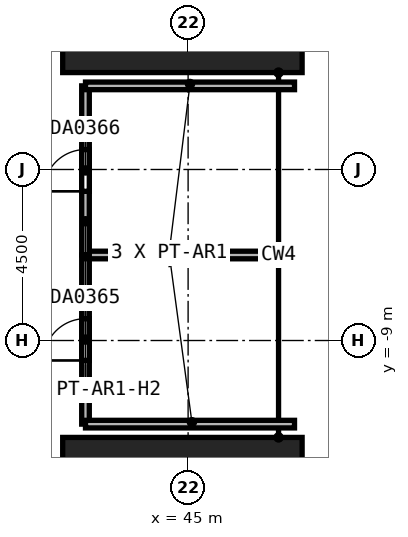
"""IFC4 building model, lengths in metres.
Left out: names, types, materials, properties, quantities, classifications, styles, units other than length and angle.
Written with IfcOpenShell. Run it as: python <this file> out.ifc"""

import sys

from ifc_helpers import new_model, si_unit, direction, frame, frame_2d, origin, origin_2d, place, context, subcontext, project, spatial, rectangle, extrude, element, fill, save


model = new_model("IFC4")
c1 = context("Model", 3, precision=1e-05, world=origin(), true_north=direction((0.0, 1.0)))
c2 = subcontext(c1, "Body", "Model", "MODEL_VIEW")
j1 = project(units=[si_unit("LENGTHUNIT", "METRE"), si_unit("PLANEANGLEUNIT", "RADIAN")], contexts=[c1])
p1 = place(None, origin())
s1 = spatial("IfcSite", under=j1, at=p1, CompositionType="ELEMENT")
p2 = place(p1, origin())
s2 = spatial("IfcBuilding", under=s1, at=p2, CompositionType="ELEMENT")
p3 = place(p2, frame((0.0, 0.0, 19.0)))
s3 = spatial("IfcBuildingStorey", under=s2, at=p3, CompositionType="ELEMENT", Elevation=19.0)
for number, where, z_axis, x_axis in (
    (1, (44.85, -13.5, 0.0), (0.0, 0.0, 1.0), (0.0, 1.0, 0.0)),
    (2, (44.85, 0.0, 0.0), (0.0, 0.0, 1.0), (0.0, 1.0, 0.0)),
):
    element("IfcColumn", number, at=place(p3, frame(where, z_axis=z_axis, x_axis=x_axis)), inside=s3, PredefinedType="COLUMN", context=c2, shape_type="SweptSolid", body=[
        extrude(rectangle(XDim=3.9, YDim=6.3, at=origin_2d()), origin(), (0.0, 0.0, 1.0), 6.0),
    ])
p4 = place(p3, frame((42.3, -11.2, 0.0), z_axis=(0.0, 0.0, 1.0), x_axis=(0.0, 1.0, 0.0)))
e3 = element("IfcWall", 3, at=p4, inside=s3, PredefinedType="PARTITIONING", context=c2, shape_type="SweptSolid", body=[
    extrude(rectangle(XDim=4.45, YDim=0.2, at=frame_2d((2.225, 0.0))), origin(), (0.0, 0.0, 1.0), 4.5),
])
p5 = place(p4, frame((1.675, 0.0, 0.0)))
e4 = element("IfcOpeningElement", 4, at=p5, cuts=e3, PredefinedType="OPENING", context=c2, shape_type="SweptSolid", body=[
    extrude(rectangle(XDim=1.1, YDim=2.4, at=frame_2d((0.55, 1.2))), frame((0.0, 0.1, 0.0), z_axis=(0.0, -1.0, 0.0), x_axis=(1.0, 0.0, 0.0)), (0.0, 0.0, 1.0), 0.2),
])
for number, where, z_axis, x_axis in (
    (5, (42.3, -11.2, 0.0), (0.0, 0.0, 1.0), (1.0, 0.0, 0.0)),
    (6, (42.3, -6.75, 0.0), (0.0, 0.0, 1.0), (1.0, 0.0, 0.0)),
):
    element("IfcWall", number, at=place(p3, frame(where, z_axis=z_axis, x_axis=x_axis)), inside=s3, PredefinedType="PARTITIONING", context=c2, shape_type="SweptSolid", body=[
        extrude(rectangle(XDim=5.5, YDim=0.2, at=frame_2d((2.75, 0.0))), origin(), (0.0, 0.0, 1.0), 5.7),
    ])
p6 = place(p3, frame((42.3, -6.75, 0.0), z_axis=(0.0, 0.0, 1.0), x_axis=(0.0, 1.0, 0.0)))
e7 = element("IfcWall", 7, at=p6, inside=s3, PredefinedType="PARTITIONING", context=c2, shape_type="SweptSolid", body=[
    extrude(rectangle(XDim=4.45, YDim=0.2, at=frame_2d((2.225, 0.0))), origin(), (0.0, 0.0, 1.0), 4.5),
])
p7 = place(p6, frame((1.675, 0.0, 0.0)))
e8 = element("IfcOpeningElement", 8, at=p7, cuts=e7, PredefinedType="OPENING", context=c2, shape_type="SweptSolid", body=[
    extrude(rectangle(XDim=1.1, YDim=2.4, at=frame_2d((0.55, 1.2))), frame((0.0, 0.1, 0.0), z_axis=(0.0, -1.0, 0.0), x_axis=(1.0, 0.0, 0.0)), (0.0, 0.0, 1.0), 0.2),
])
p8 = place(p3, frame((42.3, -2.3, 0.0), z_axis=(0.0, 0.0, 1.0), x_axis=(1.0, 0.0, 0.0)))
e9 = element("IfcWall", 9, at=p8, inside=s3, PredefinedType="PARTITIONING", context=c2, shape_type="SweptSolid", body=[
    extrude(rectangle(XDim=5.5, YDim=0.2, at=frame_2d((2.75, 0.0))), origin(), (0.0, 0.0, 1.0), 5.7),
])
p9 = place(p5, origin())
e10 = element("IfcDoor", 10, at=p9, inside=s3, OperationType="DOUBLE_DOOR_SINGLE_SWING", PredefinedType="DOOR", context=c2, shape_type="SweptSolid", body=[
    extrude(rectangle(XDim=1.1, YDim=2.4, at=frame_2d((0.55, 1.2))), frame((0.0, 0.025, 0.0), z_axis=(0.0, -1.0, 0.0), x_axis=(1.0, 0.0, 0.0)), (0.0, 0.0, 1.0), 0.05),
])
fill(e4, e10)
p10 = place(p7, origin())
e11 = element("IfcDoor", 11, at=p10, inside=s3, OperationType="DOUBLE_DOOR_SINGLE_SWING", PredefinedType="DOOR", context=c2, shape_type="SweptSolid", body=[
    extrude(rectangle(XDim=1.1, YDim=2.4, at=frame_2d((0.55, 1.2))), frame((0.0, 0.025, 0.0), z_axis=(0.0, -1.0, 0.0), x_axis=(1.0, 0.0, 0.0)), (0.0, 0.0, 1.0), 0.05),
])
fill(e8, e11)
save(model, sys.argv[1])
